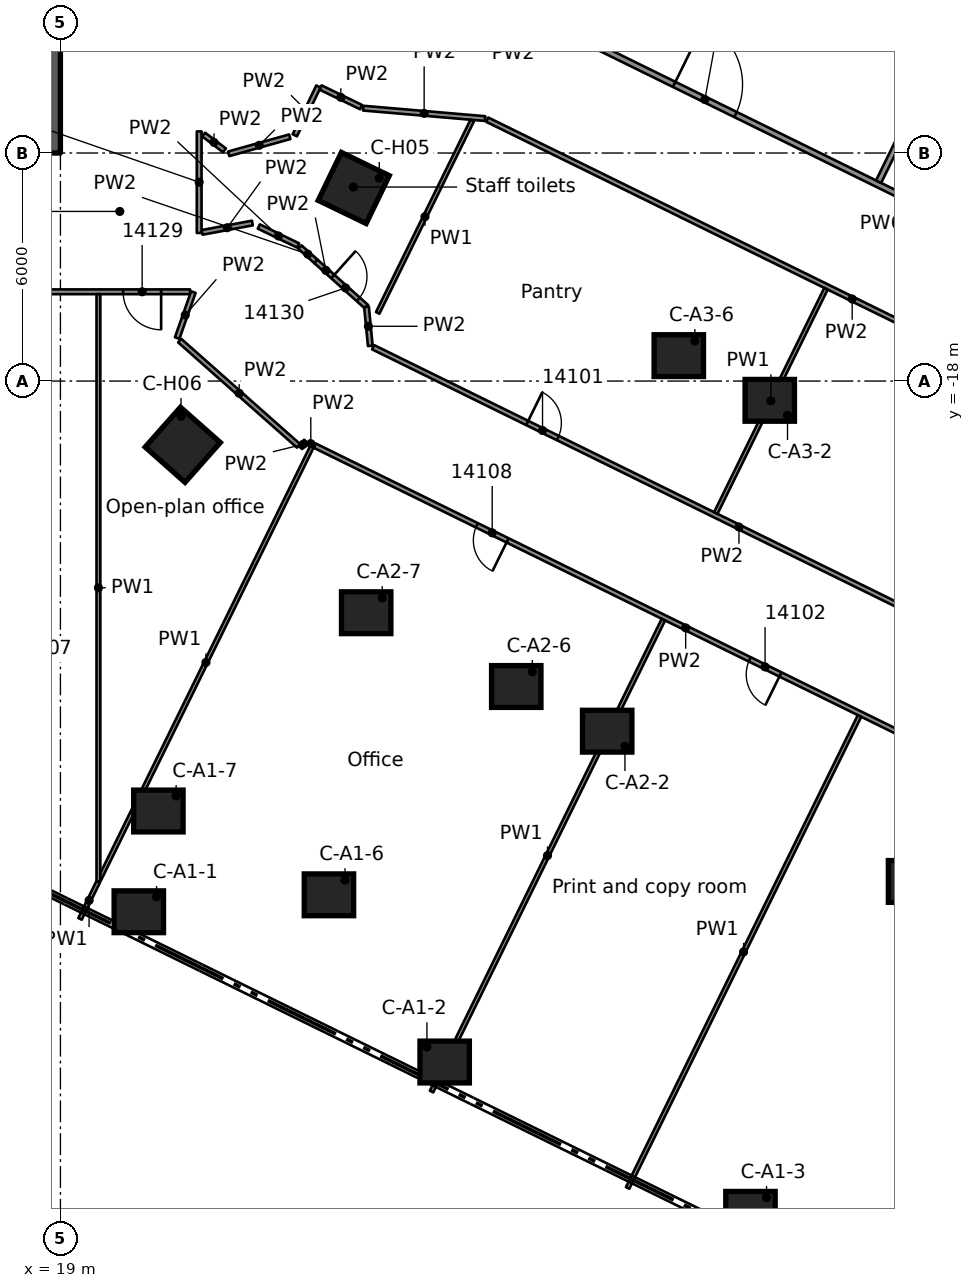
"""IFC4 building model, lengths in metres.
Left out: names, types, materials, properties, quantities, classifications, styles, units other than length and angle.
Written with IfcOpenShell. Run it as: python <this file> out.ifc"""

import sys

from ifc_helpers import new_model, si_unit, direction, frame, frame_2d, origin, origin_2d, place, context, subcontext, project, spatial, rectangle, extrude, element, fill, save


model = new_model("IFC4")
c1 = context("Model", 3, precision=1e-05, world=origin(), true_north=direction((0.0, 1.0)))
c2 = subcontext(c1, "Body", "Model", "MODEL_VIEW")
j1 = project(units=[si_unit("LENGTHUNIT", "METRE"), si_unit("PLANEANGLEUNIT", "RADIAN")], contexts=[c1])
p1 = place(None, origin())
s1 = spatial("IfcSite", under=j1, at=p1, CompositionType="ELEMENT")
p2 = place(p1, origin())
s2 = spatial("IfcBuilding", under=s1, at=p2, CompositionType="ELEMENT")
p3 = place(p2, frame((0.0, 0.0, 69.3)))
s3 = spatial("IfcBuildingStorey", under=s2, at=p3, CompositionType="ELEMENT", Elevation=69.3)
p4 = place(p3, frame((18.55, -12.0, 0.0), z_axis=(0.0, 0.0, 1.0), x_axis=(0.0, 1.0, 0.0)))
e1 = element("IfcWall", 1, at=p4, inside=s3, PredefinedType="SHEAR", context=c2, shape_type="SweptSolid", body=[
    extrude(rectangle(XDim=24.0, YDim=0.9, at=frame_2d((12.0, 0.0))), origin(), (0.0, 0.0, 1.0), 3.5),
])
p5 = place(p4, frame((12.1, 0.0, 0.0)))
e2 = element("IfcOpeningElement", 2, at=p5, cuts=e1, PredefinedType="OPENING", context=c2, shape_type="SweptSolid", body=[
    extrude(rectangle(XDim=1.8, YDim=2.1, at=frame_2d((0.9, 1.05))), frame((0.0, 0.46, 0.0), z_axis=(0.0, -1.0, 0.0), x_axis=(1.0, 0.0, 0.0)), (0.0, 0.0, 1.0), 0.92),
])
for number, where, z_axis, x_axis in (
    (3, (21.063, -31.964, 0.0), (0.0, 0.0, 1.0), (1.0, 0.0, 0.0)),
    (4, (29.111, -35.918, 0.0), (0.0, 0.0, 1.0), (1.0, 0.0, 0.0)),
    (5, (37.158, -39.873, 0.0), (0.0, 0.0, 1.0), (1.0, 0.0, 0.0)),
    (6, (26.066, -31.518, 0.0), (0.0, 0.0, 1.0), (1.0, 0.0, 0.0)),
    (7, (21.578, -29.313, 0.0), (0.0, 0.0, 1.0), (1.0, 0.0, 0.0)),
    (8, (33.388, -27.213, 0.0), (0.0, 0.0, 1.0), (1.0, 0.0, 0.0)),
    (9, (41.436, -31.167, 0.0), (0.0, 0.0, 1.0), (1.0, 0.0, 0.0)),
    (10, (30.995, -26.037, 0.0), (0.0, 0.0, 1.0), (1.0, 0.0, 0.0)),
    (11, (27.046, -24.096, 0.0), (0.0, 0.0, 1.0), (1.0, 0.0, 0.0)),
    (12, (37.666, -18.507, 0.0), (0.0, 0.0, 1.0), (1.0, 0.0, 0.0)),
    (13, (35.272, -17.331, 0.0), (0.0, 0.0, 1.0), (1.0, 0.0, 0.0)),
):
    element("IfcColumn", number, at=place(p3, frame(where, z_axis=z_axis, x_axis=x_axis)), inside=s3, PredefinedType="COLUMN", context=c2, shape_type="SweptSolid", body=[
        extrude(rectangle(XDim=1.3, YDim=1.1, at=origin_2d()), origin(), (0.0, 0.0, 1.0), 3.5),
    ])
for number, where, z_axis, x_axis in (
    (14, (26.719, -12.92, 0.0), (0.0, 0.0, 1.0), (0.9, -0.435, 0.0)),
    (15, (22.219, -19.677, 0.0), (0.0, 0.0, 1.0), (0.749, -0.663, 0.0)),
):
    element("IfcColumn", number, at=place(p3, frame(where, z_axis=z_axis, x_axis=x_axis)), inside=s3, PredefinedType="COLUMN", context=c2, shape_type="SweptSolid", body=[
        extrude(rectangle(XDim=1.4, YDim=1.4, at=origin_2d()), origin(), (0.0, 0.0, 1.0), 3.5),
    ])
p6 = place(p3, frame((25.72, -14.849, 0.0), z_axis=(0.0, 0.0, 1.0), x_axis=(0.744891794115, -0.667185292899, 0.0)))
e16 = element("IfcWall", 16, at=p6, inside=s3, PredefinedType="PARTITIONING", context=c2, shape_type="SweptSolid", body=[
    extrude(rectangle(XDim=1.791, YDim=0.125, at=frame_2d((0.896, 0.0))), origin(), (0.0, 0.0, 1.0), 3.03),
])
p7 = place(p6, frame((0.6, 0.0, 0.0)))
e17 = element("IfcOpeningElement", 17, at=p7, cuts=e16, PredefinedType="OPENING", context=c2, shape_type="SweptSolid", body=[
    extrude(rectangle(XDim=0.9, YDim=2.1, at=frame_2d((0.45, 1.05))), frame((0.0, 0.073, 0.0), z_axis=(0.0, -1.0, 0.0), x_axis=(1.0, 0.0, 0.0)), (0.0, 0.0, 1.0), 0.145),
])
p8 = place(p3, frame((25.302, -14.475, 0.0), z_axis=(0.0, 0.0, 1.0), x_axis=(0.745195775022, -0.666845751947, 0.0)))
e18 = element("IfcWall", 18, at=p8, inside=s3, PredefinedType="PARTITIONING", context=c2, shape_type="SweptSolid", body=[
    extrude(rectangle(XDim=0.561, YDim=0.125, at=frame_2d((0.28, 0.0))), origin(), (0.0, 0.0, 1.0), 3.03),
])
p9 = place(p3, frame((22.139, -16.936, 0.0), z_axis=(0.0, 0.0, 1.0), x_axis=(0.748665235529, -0.662948237127, 0.0)))
e19 = element("IfcWall", 19, at=p9, inside=s3, PredefinedType="PARTITIONING", context=c2, shape_type="SweptSolid", body=[
    extrude(rectangle(XDim=4.178, YDim=0.125, at=frame_2d((2.089, 0.0))), origin(), (0.0, 0.0, 1.0), 3.03),
])
p10 = place(p3, frame((22.768, -11.514, 0.0), z_axis=(0.0, 0.0, 1.0), x_axis=(0.797092148154, -0.603857687995, 0.0)))
e20 = element("IfcWall", 20, at=p10, inside=s3, PredefinedType="PARTITIONING", context=c2, shape_type="SweptSolid", body=[
    extrude(rectangle(XDim=0.687, YDim=0.125, at=frame_2d((0.344, 0.0))), origin(), (0.0, 0.0, 1.0), 3.03),
])
p11 = place(p3, frame((45.217, -29.292, 0.0), z_axis=(0.0, 0.0, 1.0), x_axis=(-0.897531499345, 0.440950346053, 0.0)))
e21 = element("IfcWall", 21, at=p11, inside=s3, PredefinedType="PARTITIONING", context=c2, shape_type="SweptSolid", body=[
    extrude(rectangle(XDim=21.758, YDim=0.125, at=frame_2d((10.879, 0.0))), origin(), (0.0, 0.0, 1.0), 3.03),
])
p12 = place(p11, frame((8.101, 0.0, 0.0)))
e22 = element("IfcOpeningElement", 22, at=p12, cuts=e21, PredefinedType="OPENING", context=c2, shape_type="SweptSolid", body=[
    extrude(rectangle(XDim=0.9, YDim=2.1, at=frame_2d((0.45, 1.05))), frame((0.0, 0.073, 0.0), z_axis=(0.0, -1.0, 0.0), x_axis=(1.0, 0.0, 0.0)), (0.0, 0.0, 1.0), 0.145),
])
p13 = place(p11, frame((16.101, 0.0, 0.0)))
e23 = element("IfcOpeningElement", 23, at=p13, cuts=e21, PredefinedType="OPENING", context=c2, shape_type="SweptSolid", body=[
    extrude(rectangle(XDim=0.9, YDim=2.1, at=frame_2d((0.45, 1.05))), frame((0.0, 0.073, 0.0), z_axis=(0.0, -1.0, 0.0), x_axis=(1.0, 0.0, 0.0)), (0.0, 0.0, 1.0), 0.145),
])
p14 = place(p3, frame((25.533, -19.621, 0.0), z_axis=(0.0, 0.0, 1.0), x_axis=(0.896388597083, -0.44326908647, 0.0)))
e24 = element("IfcWall", 24, at=p14, inside=s3, PredefinedType="PARTITIONING", context=c2, shape_type="SweptSolid", body=[
    extrude(rectangle(XDim=0.124, YDim=0.125, at=frame_2d((0.062, 0.0))), origin(), (0.0, 0.0, 1.0), 3.03),
])
p15 = place(p3, frame((27.228, -17.11, 0.0), z_axis=(0.0, 0.0, 1.0), x_axis=(0.897483206538, -0.441048629952, 0.0)))
e25 = element("IfcWall", 25, at=p15, inside=s3, PredefinedType="PARTITIONING", context=c2, shape_type="SweptSolid", body=[
    extrude(rectangle(XDim=21.453, YDim=0.125, at=frame_2d((10.727, 0.0))), origin(), (0.0, 0.0, 1.0), 3.03),
])
p16 = place(p15, frame((4.518, 0.0, 0.0)))
e26 = element("IfcOpeningElement", 26, at=p16, cuts=e25, PredefinedType="OPENING", context=c2, shape_type="SweptSolid", body=[
    extrude(rectangle(XDim=0.9, YDim=2.1, at=frame_2d((0.45, 1.05))), frame((0.0, 0.073, 0.0), z_axis=(0.0, -1.0, 0.0), x_axis=(1.0, 0.0, 0.0)), (0.0, 0.0, 1.0), 0.145),
])
p17 = place(p15, frame((15.367, 0.0, 0.0)))
e27 = element("IfcOpeningElement", 27, at=p17, cuts=e25, PredefinedType="OPENING", context=c2, shape_type="SweptSolid", body=[
    extrude(rectangle(XDim=0.9, YDim=2.1, at=frame_2d((0.45, 1.05))), frame((0.0, 0.073, 0.0), z_axis=(0.0, -1.0, 0.0), x_axis=(1.0, 0.0, 0.0)), (0.0, 0.0, 1.0), 0.145),
])
p18 = place(p3, frame((49.438, -20.558, 0.0), z_axis=(0.0, 0.0, 1.0), x_axis=(-0.897535791299, 0.440941609896, 0.0)))
e28 = element("IfcWall", 28, at=p18, inside=s3, PredefinedType="PARTITIONING", context=c2, shape_type="SweptSolid", body=[
    extrude(rectangle(XDim=21.4, YDim=0.125, at=frame_2d((10.7, 0.0))), origin(), (0.0, 0.0, 1.0), 3.03),
])
p19 = place(p18, frame((5.288, 0.0, 0.0)))
e29 = element("IfcOpeningElement", 29, at=p19, cuts=e28, PredefinedType="OPENING", context=c2, shape_type="SweptSolid", body=[
    extrude(rectangle(XDim=0.9, YDim=2.1, at=frame_2d((0.45, 1.05))), frame((0.0, 0.073, 0.0), z_axis=(0.0, -1.0, 0.0), x_axis=(1.0, 0.0, 0.0)), (0.0, 0.0, 1.0), 0.145),
])
p20 = place(p3, frame((31.291, -8.298, 0.0), z_axis=(0.0, 0.0, 1.0), x_axis=(0.897505006542, -0.441004266683, 0.0)))
e30 = element("IfcWall", 30, at=p20, inside=s3, PredefinedType="PARTITIONING", context=c2, shape_type="SweptSolid", body=[
    extrude(rectangle(XDim=21.757, YDim=0.15, at=frame_2d((10.878, 0.0))), origin(), (0.0, 0.0, 1.0), 3.03),
])
p21 = place(p20, frame((4.3, 0.0, 0.0)))
e31 = element("IfcOpeningElement", 31, at=p21, cuts=e30, PredefinedType="OPENING", context=c2, shape_type="SweptSolid", body=[
    extrude(rectangle(XDim=1.8, YDim=2.1, at=frame_2d((0.9, 1.05))), frame((0.0, 0.085, 0.0), z_axis=(0.0, -1.0, 0.0), x_axis=(1.0, 0.0, 0.0)), (0.0, 0.0, 1.0), 0.17),
])
p22 = place(p20, frame((12.606, 0.0, 0.0)))
e32 = element("IfcOpeningElement", 32, at=p22, cuts=e30, PredefinedType="OPENING", context=c2, shape_type="SweptSolid", body=[
    extrude(rectangle(XDim=0.9, YDim=2.1, at=frame_2d((0.45, 1.05))), frame((0.0, 0.085, 0.0), z_axis=(0.0, -1.0, 0.0), x_axis=(1.0, 0.0, 0.0)), (0.0, 0.0, 1.0), 0.17),
])
p23 = place(p20, frame((18.357, 0.0, 0.0)))
e33 = element("IfcOpeningElement", 33, at=p23, cuts=e30, PredefinedType="OPENING", context=c2, shape_type="SweptSolid", body=[
    extrude(rectangle(XDim=0.9, YDim=2.1, at=frame_2d((0.45, 1.05))), frame((0.0, 0.085, 0.0), z_axis=(0.0, -1.0, 0.0), x_axis=(1.0, 0.0, 0.0)), (0.0, 0.0, 1.0), 0.17),
])
p24 = place(p3, frame((24.22, -13.933, 0.0), z_axis=(0.0, 0.0, 1.0), x_axis=(0.900419681582, -0.435022294853, 0.0)))
e34 = element("IfcWall", 34, at=p24, inside=s3, PredefinedType="PARTITIONING", context=c2, shape_type="SweptSolid", body=[
    extrude(rectangle(XDim=1.149, YDim=0.125, at=frame_2d((0.575, 0.0))), origin(), (0.0, 0.0, 1.0), 3.03),
])
p25 = place(p3, frame((25.845, -10.276, 0.0), z_axis=(0.0, 0.0, 1.0), x_axis=(0.900044500098, -0.435798001193, 0.0)))
e35 = element("IfcWall", 35, at=p25, inside=s3, PredefinedType="PARTITIONING", context=c2, shape_type="SweptSolid", body=[
    extrude(rectangle(XDim=1.184, YDim=0.125, at=frame_2d((0.592, 0.0))), origin(), (0.0, 0.0, 1.0), 3.03),
])
p26 = place(p3, frame((26.967, -10.819, 0.0), z_axis=(0.0, 0.0, 1.0), x_axis=(0.99634849222, -0.085379634874, 0.0)))
e36 = element("IfcWall", 36, at=p26, inside=s3, PredefinedType="PARTITIONING", context=c2, shape_type="SweptSolid", body=[
    extrude(rectangle(XDim=3.22, YDim=0.125, at=frame_2d((1.61, 0.0))), origin(), (0.0, 0.0, 1.0), 3.03),
])
p27 = place(p3, frame((22.412, -15.651, 0.0), z_axis=(0.0, 0.0, 1.0), x_axis=(-1.0, 0.0, 0.0)))
e37 = element("IfcWall", 37, at=p27, inside=s3, PredefinedType="PARTITIONING", context=c2, shape_type="SweptSolid", body=[
    extrude(rectangle(XDim=10.252, YDim=0.125, at=frame_2d((5.126, 0.0))), origin(), (0.0, 0.0, 1.0), 3.03),
])
p28 = place(p27, frame((0.762, 0.0, 0.0)))
e38 = element("IfcOpeningElement", 38, at=p28, cuts=e37, PredefinedType="OPENING", context=c2, shape_type="SweptSolid", body=[
    extrude(rectangle(XDim=1.0, YDim=2.1, at=frame_2d((0.5, 1.05))), frame((0.0, 0.073, 0.0), z_axis=(0.0, -1.0, 0.0), x_axis=(1.0, 0.0, 0.0)), (0.0, 0.0, 1.0), 0.145),
])
p29 = place(p3, frame((22.729, -14.088, 0.0), z_axis=(0.0, 0.0, 1.0), x_axis=(0.983144472478, 0.182830375584, 0.0)))
e39 = element("IfcWall", 39, at=p29, inside=s3, PredefinedType="PARTITIONING", context=c2, shape_type="SweptSolid", body=[
    extrude(rectangle(XDim=1.345, YDim=0.125, at=frame_2d((0.672, 0.0))), origin(), (0.0, 0.0, 1.0), 3.03),
])
p30 = place(p3, frame((23.428, -12.021, 0.0), z_axis=(0.0, 0.0, 1.0), x_axis=(0.963114320188, 0.269092560745, 0.0)))
e40 = element("IfcWall", 40, at=p30, inside=s3, PredefinedType="PARTITIONING", context=c2, shape_type="SweptSolid", body=[
    extrude(rectangle(XDim=1.668, YDim=0.125, at=frame_2d((0.834, 0.0))), origin(), (0.0, 0.0, 1.0), 3.03),
])
p31 = place(p3, frame((27.154, -17.074, 0.0), z_axis=(0.0, 0.0, 1.0), x_axis=(-0.09672377766, 0.995311263292, 0.0)))
e41 = element("IfcWall", 41, at=p31, inside=s3, PredefinedType="PARTITIONING", context=c2, shape_type="SweptSolid", body=[
    extrude(rectangle(XDim=1.035, YDim=0.125, at=frame_2d((0.518, 0.0))), origin(), (0.0, 0.0, 1.0), 3.03),
])
p32 = place(p3, frame((25.314, -19.747, 0.0), z_axis=(0.0, 0.0, 1.0), x_axis=(0.666729237328, 0.745300022872, 0.0)))
e42 = element("IfcWall", 42, at=p32, inside=s3, PredefinedType="PARTITIONING", context=c2, shape_type="SweptSolid", body=[
    extrude(rectangle(XDim=0.218, YDim=0.125, at=frame_2d((0.109, 0.0))), origin(), (0.0, 0.0, 1.0), 3.03),
])
p33 = place(p3, frame((33.926, -39.23, 0.0), z_axis=(0.0, 0.0, 1.0), x_axis=(0.441020089077, 0.897497231768, 0.0)))
e43 = element("IfcWall", 43, at=p33, inside=s3, PredefinedType="PARTITIONING", context=c2, shape_type="SweptSolid", body=[
    extrude(rectangle(XDim=13.836, YDim=0.1, at=frame_2d((6.918, 0.0))), origin(), (0.0, 0.0, 1.0), 3.03),
])
p34 = place(p3, frame((28.766, -36.695, 0.0), z_axis=(0.0, 0.0, 1.0), x_axis=(0.440949019424, 0.897532151106, 0.0)))
e44 = element("IfcWall", 44, at=p34, inside=s3, PredefinedType="PARTITIONING", context=c2, shape_type="SweptSolid", body=[
    extrude(rectangle(XDim=13.836, YDim=0.1, at=frame_2d((6.918, 0.0))), origin(), (0.0, 0.0, 1.0), 3.03),
])
p35 = place(p3, frame((36.246, -21.472, 0.0), z_axis=(0.0, 0.0, 1.0), x_axis=(0.440934319879, 0.897539372703, 0.0)))
e45 = element("IfcWall", 45, at=p35, inside=s3, PredefinedType="PARTITIONING", context=c2, shape_type="SweptSolid", body=[
    extrude(rectangle(XDim=6.574, YDim=0.1, at=frame_2d((3.287, 0.0))), origin(), (0.0, 0.0, 1.0), 3.03),
])
p36 = place(p3, frame((40.529, -12.754, 0.0), z_axis=(0.0, 0.0, 1.0), x_axis=(0.441035914892, 0.897489454966, 0.0)))
e46 = element("IfcWall", 46, at=p36, inside=s3, PredefinedType="PARTITIONING", context=c2, shape_type="SweptSolid", body=[
    extrude(rectangle(XDim=13.824, YDim=0.15, at=frame_2d((6.912, 0.0))), origin(), (0.0, 0.0, 1.0), 2.395),
])
p37 = place(p3, frame((20.015, -31.133, 0.0), z_axis=(0.0, 0.0, 1.0), x_axis=(0.440975509771, 0.897519136165, 0.0)))
e47 = element("IfcWall", 47, at=p37, inside=s3, PredefinedType="PARTITIONING", context=c2, shape_type="SweptSolid", body=[
    extrude(rectangle(XDim=12.765, YDim=0.1, at=frame_2d((6.383, 0.0))), origin(), (0.0, 0.0, 1.0), 3.03),
])
p38 = place(p3, frame((27.349, -16.206, 0.0), z_axis=(0.0, 0.0, 1.0), x_axis=(0.441071560189, 0.897471937607, 0.0)))
e48 = element("IfcWall", 48, at=p38, inside=s3, PredefinedType="PARTITIONING", context=c2, shape_type="SweptSolid", body=[
    extrude(rectangle(XDim=5.638, YDim=0.1, at=frame_2d((2.819, 0.0))), origin(), (0.0, 0.0, 1.0), 3.03),
])
p39 = place(p3, frame((19.516, -32.151, 0.0), z_axis=(0.0, 0.0, 1.0), x_axis=(0.44043528265, 0.897784362638, 0.0)))
e49 = element("IfcWall", 49, at=p39, inside=s3, PredefinedType="PARTITIONING", context=c2, shape_type="SweptSolid", body=[
    extrude(rectangle(XDim=1.083, YDim=0.1, at=frame_2d((0.541, 0.0))), origin(), (0.0, 0.0, 1.0), 3.03),
])
p40 = place(p3, frame((25.168, -11.534, 0.0), z_axis=(0.0, 0.0, 1.0), x_axis=(0.435198706136, 0.900334430186, 0.0)))
e50 = element("IfcWall", 50, at=p40, inside=s3, PredefinedType="PARTITIONING", context=c2, shape_type="SweptSolid", body=[
    extrude(rectangle(XDim=1.427, YDim=0.125, at=frame_2d((0.714, 0.0))), origin(), (0.0, 0.0, 1.0), 3.03),
])
p41 = place(p3, frame((22.072, -16.868, 0.0), z_axis=(0.0, 0.0, 1.0), x_axis=(0.332590805705, 0.943071235889, 0.0)))
e51 = element("IfcWall", 51, at=p41, inside=s3, PredefinedType="PARTITIONING", context=c2, shape_type="SweptSolid", body=[
    extrude(rectangle(XDim=1.281, YDim=0.125, at=frame_2d((0.641, 0.0))), origin(), (0.0, 0.0, 1.0), 3.03),
])
p42 = place(p3, frame((22.651, -14.103, 0.0), z_axis=(0.0, 0.0, 1.0), x_axis=(0.0, 1.0, 0.0)))
e52 = element("IfcWall", 52, at=p42, inside=s3, PredefinedType="PARTITIONING", context=c2, shape_type="SweptSolid", body=[
    extrude(rectangle(XDim=2.671, YDim=0.125, at=frame_2d((1.335, 0.0))), origin(), (0.0, 0.0, 1.0), 3.03),
])
p43 = place(p3, frame((20.0, -31.165, 0.0), z_axis=(0.0, 0.0, 1.0), x_axis=(0.0, 1.0, 0.0)))
e53 = element("IfcWall", 53, at=p43, inside=s3, PredefinedType="PARTITIONING", context=c2, shape_type="SweptSolid", body=[
    extrude(rectangle(XDim=15.452, YDim=0.1, at=frame_2d((7.726, 0.0))), origin(), (0.0, 0.0, 1.0), 3.03),
])
p44 = place(p21, origin())
e54 = element("IfcDoor", 54, at=p44, inside=s3, OperationType="DOUBLE_DOOR_SINGLE_SWING", PredefinedType="DOOR", context=c2, shape_type="SweptSolid", body=[
    extrude(rectangle(XDim=1.8, YDim=2.1, at=frame_2d((0.9, 1.05))), frame((0.0, 0.025, 0.0), z_axis=(0.0, -1.0, 0.0), x_axis=(1.0, 0.0, 0.0)), (0.0, 0.0, 1.0), 0.05),
])
fill(e31, e54)
p45 = place(p16, origin())
e55 = element("IfcDoor", 55, at=p45, inside=s3, OperationType="SINGLE_SWING_LEFT", PredefinedType="DOOR", context=c2, shape_type="SweptSolid", body=[
    extrude(rectangle(XDim=0.9, YDim=2.1, at=frame_2d((0.45, 1.05))), frame((0.0, 0.025, 0.0), z_axis=(0.0, -1.0, 0.0), x_axis=(1.0, 0.0, 0.0)), (0.0, 0.0, 1.0), 0.05),
])
fill(e26, e55)
p46 = place(p12, origin())
e56 = element("IfcDoor", 56, at=p46, inside=s3, OperationType="SINGLE_SWING_LEFT", PredefinedType="DOOR", context=c2, shape_type="SweptSolid", body=[
    extrude(rectangle(XDim=0.9, YDim=2.1, at=frame_2d((0.45, 1.05))), frame((0.0, 0.025, 0.0), z_axis=(0.0, -1.0, 0.0), x_axis=(1.0, 0.0, 0.0)), (0.0, 0.0, 1.0), 0.05),
])
fill(e22, e56)
p47 = place(p13, origin())
e57 = element("IfcDoor", 57, at=p47, inside=s3, OperationType="SINGLE_SWING_RIGHT", PredefinedType="DOOR", context=c2, shape_type="SweptSolid", body=[
    extrude(rectangle(XDim=0.9, YDim=2.1, at=frame_2d((0.45, 1.05))), frame((0.0, 0.025, 0.0), z_axis=(0.0, -1.0, 0.0), x_axis=(1.0, 0.0, 0.0)), (0.0, 0.0, 1.0), 0.05),
])
fill(e23, e57)
p48 = place(p28, origin())
e58 = element("IfcDoor", 58, at=p48, inside=s3, OperationType="SINGLE_SWING_LEFT", PredefinedType="DOOR", context=c2, shape_type="SweptSolid", body=[
    extrude(rectangle(XDim=1.0, YDim=2.1, at=frame_2d((0.5, 1.05))), frame((0.0, 0.025, 0.0), z_axis=(0.0, -1.0, 0.0), x_axis=(1.0, 0.0, 0.0)), (0.0, 0.0, 1.0), 0.05),
])
fill(e38, e58)
p49 = place(p7, origin())
e59 = element("IfcDoor", 59, at=p49, inside=s3, OperationType="SINGLE_SWING_RIGHT", PredefinedType="DOOR", context=c2, shape_type="SweptSolid", body=[
    extrude(rectangle(XDim=0.9, YDim=2.1, at=frame_2d((0.45, 1.05))), frame((0.0, 0.025, 0.0), z_axis=(0.0, -1.0, 0.0), x_axis=(1.0, 0.0, 0.0)), (0.0, 0.0, 1.0), 0.05),
])
fill(e17, e59)
save(model, sys.argv[1])
